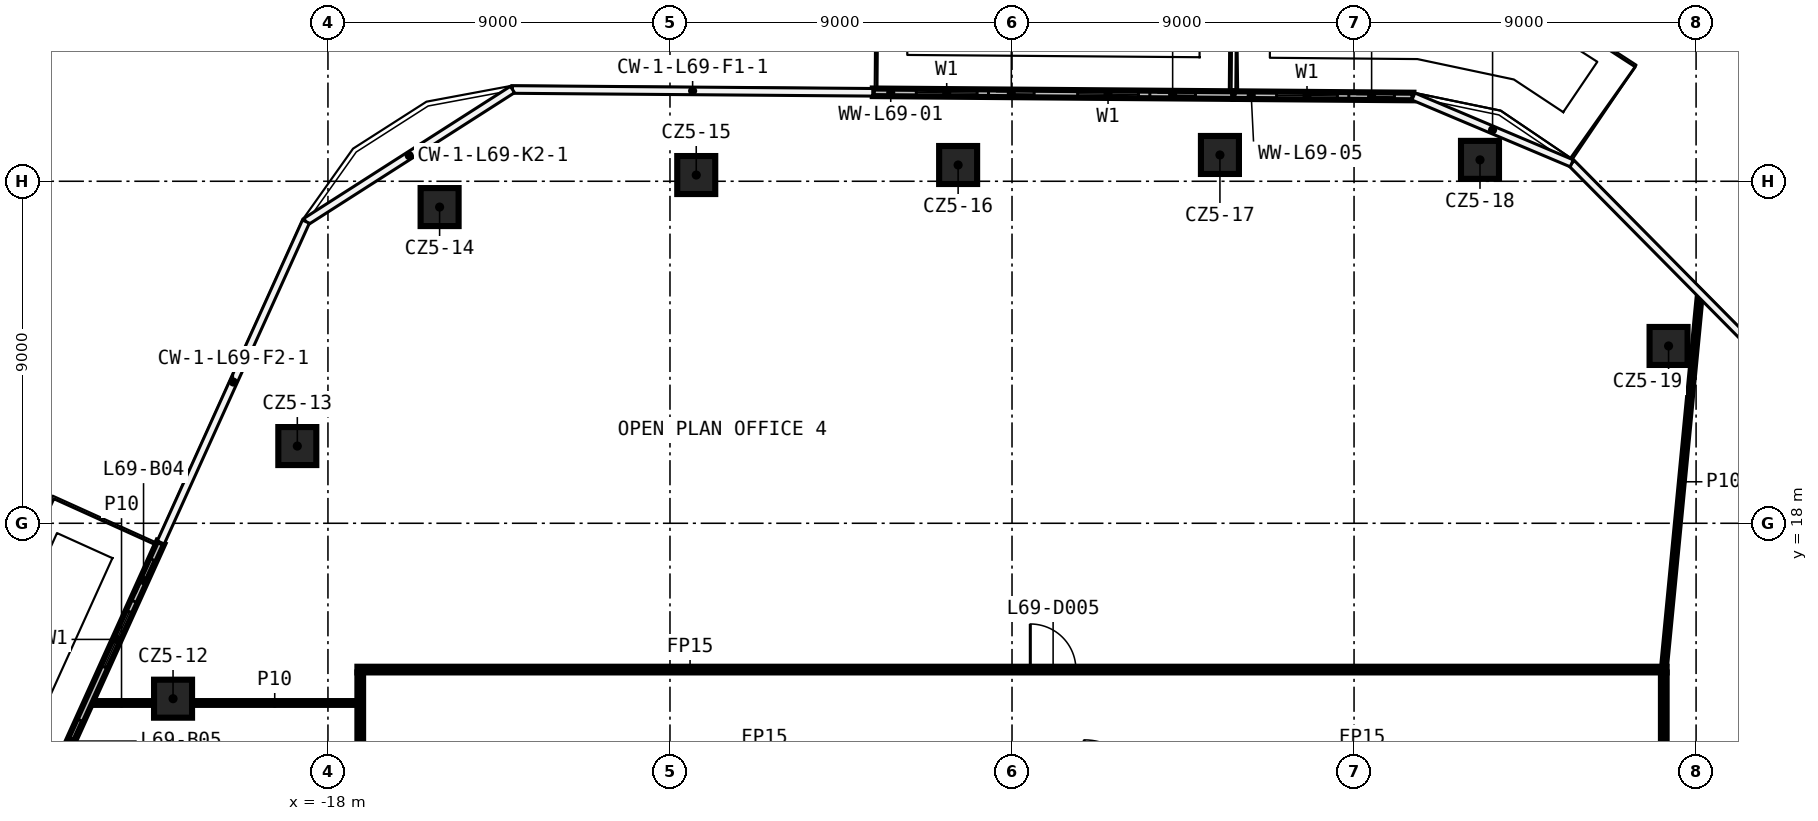
"""IFC4 building model, lengths in metres.
Left out: names, types, materials, properties, quantities, classifications, styles, units other than length and angle.
Written with IfcOpenShell. Run it as: python <this file> out.ifc"""

import sys

from ifc_helpers import new_model, si_unit, direction, frame, frame_2d, origin, origin_2d, place, context, subcontext, project, spatial, rectangle, extrude, element, fill, save


model = new_model("IFC4")
c1 = context("Model", 3, precision=1e-05, world=origin(), true_north=direction((0.0, 1.0)))
c2 = subcontext(c1, "Body", "Model", "MODEL_VIEW")
j1 = project(units=[si_unit("LENGTHUNIT", "METRE"), si_unit("PLANEANGLEUNIT", "RADIAN")], contexts=[c1])
p1 = place(None, origin())
s1 = spatial("IfcSite", under=j1, at=p1, CompositionType="ELEMENT")
p2 = place(p1, origin())
s2 = spatial("IfcBuilding", under=s1, at=p2, CompositionType="ELEMENT")
p3 = place(p2, frame((0.0, 0.0, 323.6)))
s3 = spatial("IfcBuildingStorey", under=s2, at=p3, CompositionType="ELEMENT", Elevation=323.6)
for number, where, z_axis, x_axis in (
    (1, (-22.076, 13.384, 0.0), (0.0, 0.0, 1.0), (1.0, 0.0, 0.0)),
    (2, (-18.806, 20.032, 0.0), (0.0, 0.0, 1.0), (1.0, 0.0, 0.0)),
    (3, (-15.062, 26.321, 0.0), (0.0, 0.0, 1.0), (1.0, 0.0, 0.0)),
    (4, (-8.309, 27.164, 0.0), (0.0, 0.0, 1.0), (1.0, 0.0, 0.0)),
    (5, (-1.418, 27.428, 0.0), (0.0, 0.0, 1.0), (1.0, 0.0, 0.0)),
    (6, (5.471, 27.692, 0.0), (0.0, 0.0, 1.0), (1.0, 0.0, 0.0)),
    (7, (12.314, 27.563, 0.0), (0.0, 0.0, 1.0), (1.0, 0.0, 0.0)),
    (8, (17.276, 22.666, 0.0), (0.0, 0.0, 1.0), (1.0, 0.0, 0.0)),
):
    element("IfcColumn", number, at=place(p3, frame(where, z_axis=z_axis, x_axis=x_axis)), inside=s3, PredefinedType="COLUMN", context=c2, shape_type="SweptSolid", body=[
        extrude(rectangle(XDim=1.0, YDim=1.0, at=origin_2d()), origin(), (0.0, 0.0, 1.0), 3.82),
    ])
p4 = place(p3, frame((-24.288, 13.271, 0.0), z_axis=(0.0, 0.0, 1.0), x_axis=(1.0, 0.0, 0.0)))
e9 = element("IfcWall", 9, at=p4, inside=s3, PredefinedType="PARTITIONING", context=c2, shape_type="SweptSolid", body=[
    extrude(rectangle(XDim=1.712, YDim=0.1, at=frame_2d((0.856, 0.0))), origin(), (0.0, 0.0, 1.0), 3.82),
])
p5 = place(p3, frame((-21.576, 13.271, 0.0), z_axis=(0.0, 0.0, 1.0), x_axis=(1.0, 0.0, 0.0)))
e10 = element("IfcWall", 10, at=p5, inside=s3, PredefinedType="PARTITIONING", context=c2, shape_type="SweptSolid", body=[
    extrude(rectangle(XDim=4.351, YDim=0.1, at=frame_2d((2.175, 0.0))), origin(), (0.0, 0.0, 1.0), 3.82),
])
p6 = place(p3, frame((-17.225, 14.15, 0.0), z_axis=(0.0, 0.0, 1.0), x_axis=(1.0, 0.0, 0.0)))
e11 = element("IfcWall", 11, at=p6, inside=s3, PredefinedType="PARTITIONING", context=c2, shape_type="SweptSolid", body=[
    extrude(rectangle(XDim=34.45, YDim=0.15, at=frame_2d((17.225, 0.0))), origin(), (0.0, 0.0, 1.0), 3.82),
])
p7 = place(p6, frame((17.706, 0.0, 0.0)))
e12 = element("IfcOpeningElement", 12, at=p7, cuts=e11, PredefinedType="OPENING", context=c2, shape_type="SweptSolid", body=[
    extrude(rectangle(XDim=1.2, YDim=2.1, at=frame_2d((0.6, 1.05))), frame((0.0, 0.085, 0.0), z_axis=(0.0, -1.0, 0.0), x_axis=(1.0, 0.0, 0.0)), (0.0, 0.0, 1.0), 0.17),
])
p8 = place(p3, frame((17.15, 14.15, 0.0), z_axis=(0.0, 0.0, 1.0), x_axis=(0.095686172631, 0.995411551253, 0.0)))
e13 = element("IfcWall", 13, at=p8, inside=s3, PredefinedType="PARTITIONING", context=c2, shape_type="SweptSolid", body=[
    extrude(rectangle(XDim=9.93, YDim=0.1, at=frame_2d((4.965, 0.0))), origin(), (0.0, 0.0, 1.0), 3.82),
])
p9 = place(p3, frame((17.15, 14.075, 0.0), z_axis=(0.0, 0.0, 1.0), x_axis=(0.0, -1.0, 0.0)))
e14 = element("IfcWall", 14, at=p9, inside=s3, PredefinedType="PARTITIONING", context=c2, shape_type="SweptSolid", body=[
    extrude(rectangle(XDim=28.15, YDim=0.15, at=frame_2d((14.075, 0.0))), origin(), (0.0, 0.0, 1.0), 3.82),
])
p10 = place(p9, frame((18.186, 0.0, 0.0)))
e15 = element("IfcOpeningElement", 15, at=p10, cuts=e14, PredefinedType="OPENING", context=c2, shape_type="SweptSolid", body=[
    extrude(rectangle(XDim=1.2, YDim=2.1, at=frame_2d((0.6, 1.05))), frame((0.0, 0.085, 0.0), z_axis=(0.0, -1.0, 0.0), x_axis=(1.0, 0.0, 0.0)), (0.0, 0.0, 1.0), 0.17),
])
p11 = place(p3, frame((-17.15, -14.075, 0.0), z_axis=(0.0, 0.0, 1.0), x_axis=(0.0, 1.0, 0.0)))
e16 = element("IfcWall", 16, at=p11, inside=s3, PredefinedType="PARTITIONING", context=c2, shape_type="SweptSolid", body=[
    extrude(rectangle(XDim=28.15, YDim=0.15, at=frame_2d((14.075, 0.0))), origin(), (0.0, 0.0, 1.0), 3.82),
])
p12 = place(p11, frame((18.298, 0.0, 0.0)))
e17 = element("IfcOpeningElement", 17, at=p12, cuts=e16, PredefinedType="OPENING", context=c2, shape_type="SweptSolid", body=[
    extrude(rectangle(XDim=1.2, YDim=2.1, at=frame_2d((0.6, 1.05))), frame((0.0, 0.085, 0.0), z_axis=(0.0, -1.0, 0.0), x_axis=(1.0, 0.0, 0.0)), (0.0, 0.0, 1.0), 0.17),
])
p13 = place(p3, frame((5.827, 29.267, 0.0), z_axis=(0.0, 0.0, 1.0), x_axis=(-0.999969823552, 0.007768653994, 0.0)))
e18 = element("IfcWall", 18, at=p13, inside=s3, PredefinedType="SOLIDWALL", context=c2, shape_type="SweptSolid", body=[
    extrude(rectangle(XDim=9.491, YDim=0.2, at=frame_2d((4.745, 0.0))), origin(), (0.0, 0.0, 1.0), 3.82),
])
p14 = place(p13, frame((2.5, 0.0, 0.6)))
e19 = element("IfcOpeningElement", 19, at=p14, cuts=e18, PredefinedType="OPENING", context=c2, shape_type="SweptSolid", body=[
    extrude(rectangle(XDim=1.6, YDim=2.4, at=frame_2d((0.8, 1.2))), frame((0.0, 0.11, 0.0), z_axis=(0.0, -1.0, 0.0), x_axis=(1.0, 0.0, 0.0)), (0.0, 0.0, 1.0), 0.22),
])
p15 = place(p13, frame((1.0, 0.0, 0.0)))
e20 = element("IfcOpeningElement", 20, at=p15, cuts=e18, PredefinedType="OPENING", context=c2, shape_type="SweptSolid", body=[
    extrude(rectangle(XDim=1.2, YDim=2.4, at=frame_2d((0.6, 1.2))), frame((0.0, 0.11, 0.0), z_axis=(0.0, -1.0, 0.0), x_axis=(1.0, 0.0, 0.0)), (0.0, 0.0, 1.0), 0.22),
])
p16 = place(p13, frame((6.745, 0.0, 0.6)))
e21 = element("IfcOpeningElement", 21, at=p16, cuts=e18, PredefinedType="OPENING", context=c2, shape_type="SweptSolid", body=[
    extrude(rectangle(XDim=1.6, YDim=2.4, at=frame_2d((0.8, 1.2))), frame((0.0, 0.11, 0.0), z_axis=(0.0, -1.0, 0.0), x_axis=(1.0, 0.0, 0.0)), (0.0, 0.0, 1.0), 0.22),
])
p17 = place(p13, frame((5.245, 0.0, 0.0)))
e22 = element("IfcOpeningElement", 22, at=p17, cuts=e18, PredefinedType="OPENING", context=c2, shape_type="SweptSolid", body=[
    extrude(rectangle(XDim=1.2, YDim=2.4, at=frame_2d((0.6, 1.2))), frame((0.0, 0.11, 0.0), z_axis=(0.0, -1.0, 0.0), x_axis=(1.0, 0.0, 0.0)), (0.0, 0.0, 1.0), 0.22),
])
p18 = place(p3, frame((10.562, 29.23, 0.0), z_axis=(0.0, 0.0, 1.0), x_axis=(-0.999969697406, 0.007784874423, 0.0)))
e23 = element("IfcWall", 23, at=p18, inside=s3, PredefinedType="SOLIDWALL", context=c2, shape_type="SweptSolid", body=[
    extrude(rectangle(XDim=4.736, YDim=0.2, at=frame_2d((2.368, 0.0))), origin(), (0.0, 0.0, 1.0), 3.82),
])
p19 = place(p18, frame((2.0, 0.0, 0.6)))
e24 = element("IfcOpeningElement", 24, at=p19, cuts=e23, PredefinedType="OPENING", context=c2, shape_type="SweptSolid", body=[
    extrude(rectangle(XDim=1.6, YDim=2.4, at=frame_2d((0.8, 1.2))), frame((0.0, 0.11, 0.0), z_axis=(0.0, -1.0, 0.0), x_axis=(1.0, 0.0, 0.0)), (0.0, 0.0, 1.0), 0.22),
])
p20 = place(p18, frame((0.5, 0.0, 0.0)))
e25 = element("IfcOpeningElement", 25, at=p20, cuts=e23, PredefinedType="OPENING", context=c2, shape_type="SweptSolid", body=[
    extrude(rectangle(XDim=1.2, YDim=2.4, at=frame_2d((0.6, 1.2))), frame((0.0, 0.11, 0.0), z_axis=(0.0, -1.0, 0.0), x_axis=(1.0, 0.0, 0.0)), (0.0, 0.0, 1.0), 0.22),
])
p21 = place(p3, frame((-22.399, 17.495, 0.0), z_axis=(0.0, 0.0, 1.0), x_axis=(-0.412123946496, -0.911127791654, 0.0)))
e26 = element("IfcWall", 26, at=p21, inside=s3, PredefinedType="SOLIDWALL", context=c2, shape_type="SweptSolid", body=[
    extrude(rectangle(XDim=23.18, YDim=0.2, at=frame_2d((11.59, 0.0))), origin(), (0.0, 0.0, 1.0), 3.82),
])
p22 = place(p21, frame((2.0, 0.0, 0.6)))
e27 = element("IfcOpeningElement", 27, at=p22, cuts=e26, PredefinedType="OPENING", context=c2, shape_type="SweptSolid", body=[
    extrude(rectangle(XDim=1.6, YDim=2.4, at=frame_2d((0.8, 1.2))), frame((0.0, 0.11, 0.0), z_axis=(0.0, -1.0, 0.0), x_axis=(1.0, 0.0, 0.0)), (0.0, 0.0, 1.0), 0.22),
])
p23 = place(p21, frame((0.5, 0.0, 0.0)))
e28 = element("IfcOpeningElement", 28, at=p23, cuts=e26, PredefinedType="OPENING", context=c2, shape_type="SweptSolid", body=[
    extrude(rectangle(XDim=1.2, YDim=2.4, at=frame_2d((0.6, 1.2))), frame((0.0, 0.11, 0.0), z_axis=(0.0, -1.0, 0.0), x_axis=(1.0, 0.0, 0.0)), (0.0, 0.0, 1.0), 0.22),
])
p24 = place(p21, frame((6.636, 0.0, 0.6)))
e29 = element("IfcOpeningElement", 29, at=p24, cuts=e26, PredefinedType="OPENING", context=c2, shape_type="SweptSolid", body=[
    extrude(rectangle(XDim=1.6, YDim=2.4, at=frame_2d((0.8, 1.2))), frame((0.0, 0.11, 0.0), z_axis=(0.0, -1.0, 0.0), x_axis=(1.0, 0.0, 0.0)), (0.0, 0.0, 1.0), 0.22),
])
p25 = place(p21, frame((5.136, 0.0, 0.0)))
e30 = element("IfcOpeningElement", 30, at=p25, cuts=e26, PredefinedType="OPENING", context=c2, shape_type="SweptSolid", body=[
    extrude(rectangle(XDim=1.2, YDim=2.4, at=frame_2d((0.6, 1.2))), frame((0.0, 0.11, 0.0), z_axis=(0.0, -1.0, 0.0), x_axis=(1.0, 0.0, 0.0)), (0.0, 0.0, 1.0), 0.22),
])
p26 = place(p21, frame((9.772, 0.0, 0.6)))
e31 = element("IfcOpeningElement", 31, at=p26, cuts=e26, PredefinedType="OPENING", context=c2, shape_type="SweptSolid", body=[
    extrude(rectangle(XDim=1.6, YDim=2.4, at=frame_2d((0.8, 1.2))), frame((0.0, 0.11, 0.0), z_axis=(0.0, -1.0, 0.0), x_axis=(1.0, 0.0, 0.0)), (0.0, 0.0, 1.0), 0.22),
])
p27 = place(p21, frame((11.672, 0.0, 0.0)))
e32 = element("IfcOpeningElement", 32, at=p27, cuts=e26, PredefinedType="OPENING", context=c2, shape_type="SweptSolid", body=[
    extrude(rectangle(XDim=1.2, YDim=2.4, at=frame_2d((0.6, 1.2))), frame((0.0, 0.11, 0.0), z_axis=(0.0, -1.0, 0.0), x_axis=(1.0, 0.0, 0.0)), (0.0, 0.0, 1.0), 0.22),
])
p28 = place(p21, frame((15.908, 0.0, 0.6)))
e33 = element("IfcOpeningElement", 33, at=p28, cuts=e26, PredefinedType="OPENING", context=c2, shape_type="SweptSolid", body=[
    extrude(rectangle(XDim=1.6, YDim=2.4, at=frame_2d((0.8, 1.2))), frame((0.0, 0.11, 0.0), z_axis=(0.0, -1.0, 0.0), x_axis=(1.0, 0.0, 0.0)), (0.0, 0.0, 1.0), 0.22),
])
p29 = place(p21, frame((14.408, 0.0, 0.0)))
e34 = element("IfcOpeningElement", 34, at=p29, cuts=e26, PredefinedType="OPENING", context=c2, shape_type="SweptSolid", body=[
    extrude(rectangle(XDim=1.2, YDim=2.4, at=frame_2d((0.6, 1.2))), frame((0.0, 0.11, 0.0), z_axis=(0.0, -1.0, 0.0), x_axis=(1.0, 0.0, 0.0)), (0.0, 0.0, 1.0), 0.22),
])
p30 = place(p21, frame((20.744, 0.0, 0.6)))
e35 = element("IfcOpeningElement", 35, at=p30, cuts=e26, PredefinedType="OPENING", context=c2, shape_type="SweptSolid", body=[
    extrude(rectangle(XDim=1.6, YDim=2.4, at=frame_2d((0.8, 1.2))), frame((0.0, 0.11, 0.0), z_axis=(0.0, -1.0, 0.0), x_axis=(1.0, 0.0, 0.0)), (0.0, 0.0, 1.0), 0.22),
])
p31 = place(p21, frame((19.244, 0.0, 0.0)))
e36 = element("IfcOpeningElement", 36, at=p31, cuts=e26, PredefinedType="OPENING", context=c2, shape_type="SweptSolid", body=[
    extrude(rectangle(XDim=1.2, YDim=2.4, at=frame_2d((0.6, 1.2))), frame((0.0, 0.11, 0.0), z_axis=(0.0, -1.0, 0.0), x_axis=(1.0, 0.0, 0.0)), (0.0, 0.0, 1.0), 0.22),
])
p32 = place(p7, origin())
e37 = element("IfcDoor", 37, at=p32, inside=s3, OperationType="SINGLE_SWING_RIGHT", PredefinedType="DOOR", context=c2, shape_type="SweptSolid", body=[
    extrude(rectangle(XDim=1.2, YDim=2.1, at=frame_2d((0.6, 1.05))), frame((0.0, 0.025, 0.0), z_axis=(0.0, -1.0, 0.0), x_axis=(1.0, 0.0, 0.0)), (0.0, 0.0, 1.0), 0.05),
])
fill(e12, e37)
p33 = place(p14, origin())
e38 = element("IfcWindow", 38, at=p33, inside=s3, PartitioningType="SINGLE_PANEL", PredefinedType="WINDOW", context=c2, shape_type="SweptSolid", body=[
    extrude(rectangle(XDim=1.6, YDim=2.4, at=frame_2d((0.8, 1.2))), frame((0.0, 0.03, 0.0), z_axis=(0.0, -1.0, 0.0), x_axis=(1.0, 0.0, 0.0)), (0.0, 0.0, 1.0), 0.06),
])
fill(e19, e38)
p34 = place(p15, origin())
e39 = element("IfcDoor", 39, at=p34, inside=s3, OperationType="SLIDING_TO_LEFT", PredefinedType="DOOR", context=c2, shape_type="SweptSolid", body=[
    extrude(rectangle(XDim=1.2, YDim=2.4, at=frame_2d((0.6, 1.2))), frame((0.0, 0.025, 0.0), z_axis=(0.0, -1.0, 0.0), x_axis=(1.0, 0.0, 0.0)), (0.0, 0.0, 1.0), 0.05),
])
fill(e20, e39)
p35 = place(p16, origin())
e40 = element("IfcWindow", 40, at=p35, inside=s3, PartitioningType="SINGLE_PANEL", PredefinedType="WINDOW", context=c2, shape_type="SweptSolid", body=[
    extrude(rectangle(XDim=1.6, YDim=2.4, at=frame_2d((0.8, 1.2))), frame((0.0, 0.03, 0.0), z_axis=(0.0, -1.0, 0.0), x_axis=(1.0, 0.0, 0.0)), (0.0, 0.0, 1.0), 0.06),
])
fill(e21, e40)
p36 = place(p17, origin())
e41 = element("IfcDoor", 41, at=p36, inside=s3, OperationType="SLIDING_TO_LEFT", PredefinedType="DOOR", context=c2, shape_type="SweptSolid", body=[
    extrude(rectangle(XDim=1.2, YDim=2.4, at=frame_2d((0.6, 1.2))), frame((0.0, 0.025, 0.0), z_axis=(0.0, -1.0, 0.0), x_axis=(1.0, 0.0, 0.0)), (0.0, 0.0, 1.0), 0.05),
])
fill(e22, e41)
p37 = place(p19, origin())
e42 = element("IfcWindow", 42, at=p37, inside=s3, PartitioningType="SINGLE_PANEL", PredefinedType="WINDOW", context=c2, shape_type="SweptSolid", body=[
    extrude(rectangle(XDim=1.6, YDim=2.4, at=frame_2d((0.8, 1.2))), frame((0.0, 0.03, 0.0), z_axis=(0.0, -1.0, 0.0), x_axis=(1.0, 0.0, 0.0)), (0.0, 0.0, 1.0), 0.06),
])
fill(e24, e42)
p38 = place(p20, origin())
e43 = element("IfcDoor", 43, at=p38, inside=s3, OperationType="SLIDING_TO_LEFT", PredefinedType="DOOR", context=c2, shape_type="SweptSolid", body=[
    extrude(rectangle(XDim=1.2, YDim=2.4, at=frame_2d((0.6, 1.2))), frame((0.0, 0.025, 0.0), z_axis=(0.0, -1.0, 0.0), x_axis=(1.0, 0.0, 0.0)), (0.0, 0.0, 1.0), 0.05),
])
fill(e25, e43)
p39 = place(p22, origin())
e44 = element("IfcWindow", 44, at=p39, inside=s3, PartitioningType="SINGLE_PANEL", PredefinedType="WINDOW", context=c2, shape_type="SweptSolid", body=[
    extrude(rectangle(XDim=1.6, YDim=2.4, at=frame_2d((0.8, 1.2))), frame((0.0, 0.03, 0.0), z_axis=(0.0, -1.0, 0.0), x_axis=(1.0, 0.0, 0.0)), (0.0, 0.0, 1.0), 0.06),
])
fill(e27, e44)
p40 = place(p23, origin())
e45 = element("IfcDoor", 45, at=p40, inside=s3, OperationType="SLIDING_TO_LEFT", PredefinedType="DOOR", context=c2, shape_type="SweptSolid", body=[
    extrude(rectangle(XDim=1.2, YDim=2.4, at=frame_2d((0.6, 1.2))), frame((0.0, 0.025, 0.0), z_axis=(0.0, -1.0, 0.0), x_axis=(1.0, 0.0, 0.0)), (0.0, 0.0, 1.0), 0.05),
])
fill(e28, e45)
p41 = place(p25, origin())
e46 = element("IfcDoor", 46, at=p41, inside=s3, OperationType="SLIDING_TO_LEFT", PredefinedType="DOOR", context=c2, shape_type="SweptSolid", body=[
    extrude(rectangle(XDim=1.2, YDim=2.4, at=frame_2d((0.6, 1.2))), frame((0.0, 0.025, 0.0), z_axis=(0.0, -1.0, 0.0), x_axis=(1.0, 0.0, 0.0)), (0.0, 0.0, 1.0), 0.05),
])
fill(e30, e46)
save(model, sys.argv[1])
